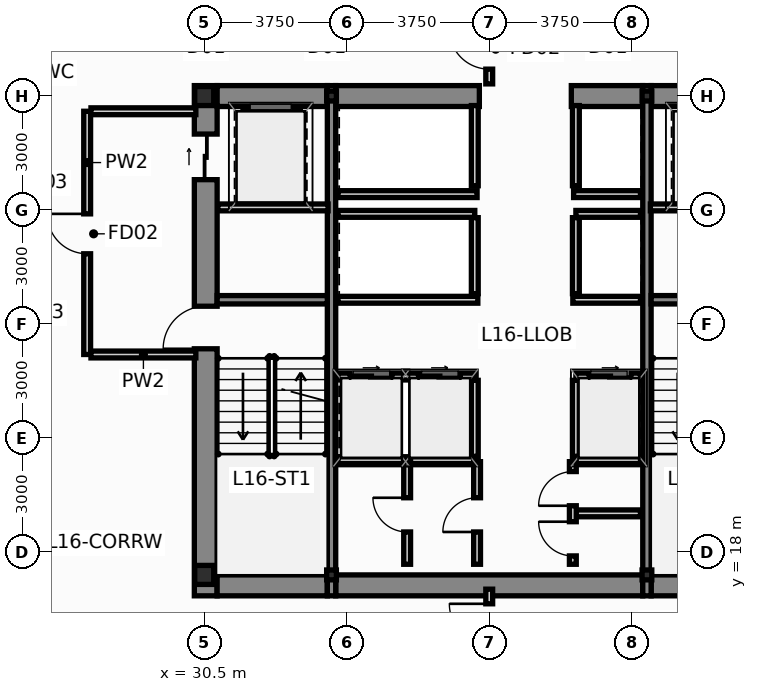
"""IFC4 building model, lengths in metres.
Left out: names, types, materials, properties, quantities, classifications, styles, units other than length and angle.
Written with IfcOpenShell. Run it as: python <this file> out.ifc"""

import sys

from ifc_helpers import new_model, si_unit, direction, frame, frame_2d, origin, origin_2d, place, context, subcontext, project, spatial, rectangle, i_section, extrude, source, transform, mapped, element, fill, save


model = new_model("IFC4")
c1 = context("Model", 3, precision=1e-05, world=origin(), true_north=direction((0.0, 1.0)))
c2 = subcontext(c1, "Body", "Model", "MODEL_VIEW")
j1 = project(units=[si_unit("LENGTHUNIT", "METRE"), si_unit("PLANEANGLEUNIT", "RADIAN")], contexts=[c1])
p1 = place(None, origin())
s1 = spatial("IfcSite", under=j1, at=p1, CompositionType="ELEMENT")
p2 = place(p1, origin())
s2 = spatial("IfcBuilding", under=s1, at=p2, CompositionType="ELEMENT")
p3 = place(p2, frame((0.0, 0.0, 64.1)))
s3 = spatial("IfcBuildingStorey", under=s2, at=p3, CompositionType="ELEMENT", Elevation=64.1)
m1 = source(origin(), c2, "Body", "SweptSolid", [
    extrude(i_section(OverallWidth=0.5, OverallDepth=0.5, WebThickness=0.028, FlangeThickness=0.04, at=origin_2d()), origin(), (0.0, 0.0, 1.0), 3.65),
])
for number, where, z_axis, x_axis in (
    (1, (30.5, 17.4, 0.0), (0.0, 0.0, 1.0), (1.0, 0.0, 0.0)),
    (2, (30.5, 30.0, 0.0), (0.0, 0.0, 1.0), (1.0, 0.0, 0.0)),
):
    element("IfcColumn", number, at=place(p3, frame(where, z_axis=z_axis, x_axis=x_axis)), inside=s3, PredefinedType="COLUMN", context=c2, shape_type="MappedRepresentation", body=[
        mapped(m1, transform((0.0, 0.0, 0.0), scale=1.0)),
    ])
m2 = source(origin(), c2, "Body", "SweptSolid", [
    extrude(i_section(OverallWidth=0.256, OverallDepth=0.26, WebThickness=0.01, FlangeThickness=0.017, at=origin_2d()), origin(), (0.0, 0.0, 1.0), 3.65),
])
for number, where, z_axis, x_axis in (
    (3, (33.85, 17.4, 0.0), (0.0, 0.0, 1.0), (1.0, 0.0, 0.0)),
    (4, (42.15, 17.4, 0.0), (0.0, 0.0, 1.0), (1.0, 0.0, 0.0)),
    (5, (33.85, 30.0, 0.0), (0.0, 0.0, 1.0), (1.0, 0.0, 0.0)),
    (6, (42.15, 30.0, 0.0), (0.0, 0.0, 1.0), (1.0, 0.0, 0.0)),
):
    element("IfcColumn", number, at=place(p3, frame(where, z_axis=z_axis, x_axis=x_axis)), inside=s3, PredefinedType="COLUMN", context=c2, shape_type="MappedRepresentation", body=[
        mapped(m2, transform((0.0, 0.0, 0.0), scale=1.0)),
    ])
p4 = place(p3, frame((30.54, 16.85, 0.0), z_axis=(0.0, 0.0, 1.0), x_axis=(0.0, 1.0, 0.0)))
e7 = element("IfcWall", 7, at=p4, inside=s3, PredefinedType="SHEAR", context=c2, shape_type="SweptSolid", body=[
    extrude(rectangle(XDim=13.425, YDim=0.6, at=frame_2d((6.712, 0.0))), origin(), (0.0, 0.0, 1.0), 3.65),
])
p5 = place(p4, frame((6.5, 0.0, 0.0)))
e8 = element("IfcOpeningElement", 8, at=p5, cuts=e7, PredefinedType="OPENING", context=c2, shape_type="SweptSolid", body=[
    extrude(rectangle(XDim=1.12, YDim=2.15, at=frame_2d((0.56, 1.075))), frame((0.0, 0.312, 0.0), z_axis=(0.0, -1.0, 0.0), x_axis=(1.0, 0.0, 0.0)), (0.0, 0.0, 1.0), 0.624),
])
p6 = place(p4, frame((10.95, 0.0, 0.0)))
e9 = element("IfcOpeningElement", 9, at=p6, cuts=e7, PredefinedType="OPENING", context=c2, shape_type="SweptSolid", body=[
    extrude(rectangle(XDim=1.2, YDim=2.2, at=frame_2d((0.6, 1.1))), frame((0.0, 0.312, 0.0), z_axis=(0.0, -1.0, 0.0), x_axis=(1.0, 0.0, 0.0)), (0.0, 0.0, 1.0), 0.624),
])
p7 = place(p3, frame((30.84, 17.125, 0.0), z_axis=(0.0, 0.0, 1.0), x_axis=(1.0, 0.0, 0.0)))
e10 = element("IfcWall", 10, at=p7, inside=s3, PredefinedType="SHEAR", context=c2, shape_type="SweptSolid", body=[
    extrude(rectangle(XDim=2.9, YDim=0.55, at=frame_2d((1.45, 0.0))), origin(), (0.0, 0.0, 1.0), 3.65),
])
p8 = place(p3, frame((33.96, 17.125, 0.0), z_axis=(0.0, 0.0, 1.0), x_axis=(1.0, 0.0, 0.0)))
e11 = element("IfcWall", 11, at=p8, inside=s3, PredefinedType="SHEAR", context=c2, shape_type="SweptSolid", body=[
    extrude(rectangle(XDim=8.08, YDim=0.55, at=frame_2d((4.04, 0.0))), origin(), (0.0, 0.0, 1.0), 3.65),
])
for number, where, z_axis, x_axis in (
    (12, (42.26, 17.125, 0.0), (0.0, 0.0, 1.0), (1.0, 0.0, 0.0)),
    (13, (30.84, 30.0, 0.0), (0.0, 0.0, 1.0), (1.0, 0.0, 0.0)),
):
    element("IfcWall", number, at=place(p3, frame(where, z_axis=z_axis, x_axis=x_axis)), inside=s3, PredefinedType="SHEAR", context=c2, shape_type="SweptSolid", body=[
        extrude(rectangle(XDim=2.9, YDim=0.55, at=frame_2d((1.45, 0.0))), origin(), (0.0, 0.0, 1.0), 3.65),
    ])
p9 = place(p3, frame((33.96, 30.0, 0.0), z_axis=(0.0, 0.0, 1.0), x_axis=(1.0, 0.0, 0.0)))
e14 = element("IfcWall", 14, at=p9, inside=s3, PredefinedType="SHEAR", context=c2, shape_type="SweptSolid", body=[
    extrude(rectangle(XDim=3.78, YDim=0.55, at=frame_2d((1.89, 0.0))), origin(), (0.0, 0.0, 1.0), 3.65),
])
p10 = place(p3, frame((40.16, 30.0, 0.0), z_axis=(0.0, 0.0, 1.0), x_axis=(1.0, 0.0, 0.0)))
e15 = element("IfcWall", 15, at=p10, inside=s3, PredefinedType="SHEAR", context=c2, shape_type="SweptSolid", body=[
    extrude(rectangle(XDim=1.88, YDim=0.55, at=frame_2d((0.94, 0.0))), origin(), (0.0, 0.0, 1.0), 3.65),
])
p11 = place(p3, frame((42.26, 30.0, 0.0), z_axis=(0.0, 0.0, 1.0), x_axis=(1.0, 0.0, 0.0)))
e16 = element("IfcWall", 16, at=p11, inside=s3, PredefinedType="SHEAR", context=c2, shape_type="SweptSolid", body=[
    extrude(rectangle(XDim=2.9, YDim=0.55, at=frame_2d((1.45, 0.0))), origin(), (0.0, 0.0, 1.0), 3.65),
])
for number, where, z_axis, x_axis in (
    (17, (33.85, 16.85, 0.0), (0.0, 0.0, 1.0), (0.0, 1.0, 0.0)),
    (18, (42.15, 16.85, 0.0), (0.0, 0.0, 1.0), (0.0, 1.0, 0.0)),
):
    element("IfcWall", number, at=place(p3, frame(where, z_axis=z_axis, x_axis=x_axis)), inside=s3, PredefinedType="SHEAR", context=c2, shape_type="SweptSolid", body=[
        extrude(rectangle(XDim=13.425, YDim=0.22, at=frame_2d((6.712, 0.0))), origin(), (0.0, 0.0, 1.0), 3.65),
    ])
for number, where, z_axis, x_axis in (
    (19, (30.84, 24.64, 0.0), (0.0, 0.0, 1.0), (1.0, 0.0, 0.0)),
    (20, (42.26, 24.64, 0.0), (0.0, 0.0, 1.0), (1.0, 0.0, 0.0)),
):
    element("IfcWall", number, at=place(p3, frame(where, z_axis=z_axis, x_axis=x_axis)), inside=s3, PredefinedType="SHEAR", context=c2, shape_type="SweptSolid", body=[
        extrude(rectangle(XDim=2.9, YDim=0.22, at=frame_2d((1.45, 0.0))), origin(), (0.0, 0.0, 1.0), 3.65),
    ])
p12 = place(p3, frame((34.02, 22.62, 0.0), z_axis=(0.0, 0.0, 1.0), x_axis=(1.0, 0.0, 0.0)))
e21 = element("IfcWall", 21, at=p12, inside=s3, PredefinedType="PARTITIONING", context=c2, shape_type="SweptSolid", body=[
    extrude(rectangle(XDim=3.6, YDim=0.18, at=frame_2d((1.8, 0.0))), origin(), (0.0, 0.0, 1.0), 3.4),
])
p13 = place(p12, frame((0.32, 0.0, 0.0)))
e22 = element("IfcOpeningElement", 22, at=p13, cuts=e21, PredefinedType="OPENING", context=c2, shape_type="SweptSolid", body=[
    extrude(rectangle(XDim=1.1, YDim=2.2, at=frame_2d((0.55, 1.1))), frame((0.0, 0.102, 0.0), z_axis=(0.0, -1.0, 0.0), x_axis=(1.0, 0.0, 0.0)), (0.0, 0.0, 1.0), 0.204),
])
p14 = place(p12, frame((2.12, 0.0, 0.0)))
e23 = element("IfcOpeningElement", 23, at=p14, cuts=e21, PredefinedType="OPENING", context=c2, shape_type="SweptSolid", body=[
    extrude(rectangle(XDim=1.1, YDim=2.2, at=frame_2d((0.55, 1.1))), frame((0.0, 0.102, 0.0), z_axis=(0.0, -1.0, 0.0), x_axis=(1.0, 0.0, 0.0)), (0.0, 0.0, 1.0), 0.204),
])
p15 = place(p3, frame((40.28, 22.62, 0.0), z_axis=(0.0, 0.0, 1.0), x_axis=(1.0, 0.0, 0.0)))
e24 = element("IfcWall", 24, at=p15, inside=s3, PredefinedType="PARTITIONING", context=c2, shape_type="SweptSolid", body=[
    extrude(rectangle(XDim=1.7, YDim=0.18, at=frame_2d((0.85, 0.0))), origin(), (0.0, 0.0, 1.0), 3.4),
])
p16 = place(p15, frame((0.35, 0.0, 0.0)))
e25 = element("IfcOpeningElement", 25, at=p16, cuts=e24, PredefinedType="OPENING", context=c2, shape_type="SweptSolid", body=[
    extrude(rectangle(XDim=1.1, YDim=2.2, at=frame_2d((0.55, 1.1))), frame((0.0, 0.102, 0.0), z_axis=(0.0, -1.0, 0.0), x_axis=(1.0, 0.0, 0.0)), (0.0, 0.0, 1.0), 0.204),
])
for number, where, z_axis, x_axis in (
    (26, (37.62, 20.52, 0.0), (0.0, 0.0, 1.0), (0.0, 1.0, 0.0)),
    (27, (40.28, 20.52, 0.0), (0.0, 0.0, 1.0), (0.0, 1.0, 0.0)),
):
    element("IfcWall", number, at=place(p3, frame(where, z_axis=z_axis, x_axis=x_axis)), inside=s3, PredefinedType="PARTITIONING", context=c2, shape_type="SweptSolid", body=[
        extrude(rectangle(XDim=2.0, YDim=0.18, at=frame_2d((1.0, 0.0))), origin(), (0.0, 0.0, 1.0), 3.4),
    ])
p17 = place(p3, frame((34.02, 26.9, 0.0), z_axis=(0.0, 0.0, 1.0), x_axis=(1.0, 0.0, 0.0)))
e28 = element("IfcWall", 28, at=p17, inside=s3, PredefinedType="PARTITIONING", context=c2, shape_type="SweptSolid", body=[
    extrude(rectangle(XDim=3.6, YDim=0.18, at=frame_2d((1.8, 0.0))), origin(), (0.0, 0.0, 1.0), 3.4),
])
p18 = place(p3, frame((40.28, 26.9, 0.0), z_axis=(0.0, 0.0, 1.0), x_axis=(1.0, 0.0, 0.0)))
e29 = element("IfcWall", 29, at=p18, inside=s3, PredefinedType="PARTITIONING", context=c2, shape_type="SweptSolid", body=[
    extrude(rectangle(XDim=1.7, YDim=0.18, at=frame_2d((0.85, 0.0))), origin(), (0.0, 0.0, 1.0), 3.4),
])
for number, where, z_axis, x_axis in (
    (30, (37.62, 24.8, 0.0), (0.0, 0.0, 1.0), (0.0, 1.0, 0.0)),
    (31, (40.28, 24.8, 0.0), (0.0, 0.0, 1.0), (0.0, 1.0, 0.0)),
):
    element("IfcWall", number, at=place(p3, frame(where, z_axis=z_axis, x_axis=x_axis)), inside=s3, PredefinedType="PARTITIONING", context=c2, shape_type="SweptSolid", body=[
        extrude(rectangle(XDim=2.0, YDim=0.18, at=frame_2d((1.0, 0.0))), origin(), (0.0, 0.0, 1.0), 3.4),
    ])
p19 = place(p3, frame((34.02, 24.64, 0.0), z_axis=(0.0, 0.0, 1.0), x_axis=(1.0, 0.0, 0.0)))
e32 = element("IfcWall", 32, at=p19, inside=s3, PredefinedType="PARTITIONING", context=c2, shape_type="SweptSolid", body=[
    extrude(rectangle(XDim=3.68, YDim=0.18, at=frame_2d((1.84, 0.0))), origin(), (0.0, 0.0, 1.0), 3.4),
])
p20 = place(p3, frame((40.2, 24.64, 0.0), z_axis=(0.0, 0.0, 1.0), x_axis=(1.0, 0.0, 0.0)))
e33 = element("IfcWall", 33, at=p20, inside=s3, PredefinedType="PARTITIONING", context=c2, shape_type="SweptSolid", body=[
    extrude(rectangle(XDim=1.78, YDim=0.18, at=frame_2d((0.89, 0.0))), origin(), (0.0, 0.0, 1.0), 3.4),
])
p21 = place(p3, frame((34.02, 27.42, 0.0), z_axis=(0.0, 0.0, 1.0), x_axis=(1.0, 0.0, 0.0)))
e34 = element("IfcWall", 34, at=p21, inside=s3, PredefinedType="PARTITIONING", context=c2, shape_type="SweptSolid", body=[
    extrude(rectangle(XDim=3.66, YDim=0.18, at=frame_2d((1.83, 0.0))), origin(), (0.0, 0.0, 1.0), 3.4),
])
p22 = place(p3, frame((40.22, 27.42, 0.0), z_axis=(0.0, 0.0, 1.0), x_axis=(1.0, 0.0, 0.0)))
e35 = element("IfcWall", 35, at=p22, inside=s3, PredefinedType="PARTITIONING", context=c2, shape_type="SweptSolid", body=[
    extrude(rectangle(XDim=1.76, YDim=0.18, at=frame_2d((0.88, 0.0))), origin(), (0.0, 0.0, 1.0), 3.4),
])
for number, where, z_axis, x_axis in (
    (36, (37.62, 27.64, 0.0), (0.0, 0.0, 1.0), (0.0, 1.0, 0.0)),
    (37, (40.28, 27.64, 0.0), (0.0, 0.0, 1.0), (0.0, 1.0, 0.0)),
):
    element("IfcWall", number, at=place(p3, frame(where, z_axis=z_axis, x_axis=x_axis)), inside=s3, PredefinedType="PARTITIONING", context=c2, shape_type="SweptSolid", body=[
        extrude(rectangle(XDim=2.11, YDim=0.18, at=frame_2d((1.055, 0.0))), origin(), (0.0, 0.0, 1.0), 3.4),
    ])
p23 = place(p3, frame((27.42, 23.2, 0.0), z_axis=(0.0, 0.0, 1.0), x_axis=(0.0, 1.0, 0.0)))
e38 = element("IfcWall", 38, at=p23, inside=s3, PredefinedType="PARTITIONING", context=c2, shape_type="SweptSolid", body=[
    extrude(rectangle(XDim=6.4, YDim=0.18, at=frame_2d((3.2, 0.0))), origin(), (0.0, 0.0, 1.0), 3.4),
])
p24 = place(p23, frame((2.65, 0.0, 0.0)))
e39 = element("IfcOpeningElement", 39, at=p24, cuts=e38, PredefinedType="OPENING", context=c2, shape_type="SweptSolid", body=[
    extrude(rectangle(XDim=1.05, YDim=2.15, at=frame_2d((0.525, 1.075))), frame((0.0, 0.102, 0.0), z_axis=(0.0, -1.0, 0.0), x_axis=(1.0, 0.0, 0.0)), (0.0, 0.0, 1.0), 0.204),
])
p25 = place(p3, frame((27.52, 23.2, 0.0), z_axis=(0.0, 0.0, 1.0), x_axis=(1.0, 0.0, 0.0)))
e40 = element("IfcWall", 40, at=p25, inside=s3, PredefinedType="PARTITIONING", context=c2, shape_type="SweptSolid", body=[
    extrude(rectangle(XDim=2.76, YDim=0.18, at=frame_2d((1.38, 0.0))), origin(), (0.0, 0.0, 1.0), 3.4),
])
p26 = place(p3, frame((27.52, 29.6, 0.0), z_axis=(0.0, 0.0, 1.0), x_axis=(1.0, 0.0, 0.0)))
e41 = element("IfcWall", 41, at=p26, inside=s3, PredefinedType="PARTITIONING", context=c2, shape_type="SweptSolid", body=[
    extrude(rectangle(XDim=2.76, YDim=0.18, at=frame_2d((1.38, 0.0))), origin(), (0.0, 0.0, 1.0), 2.783),
])
for number, where, z_axis, x_axis in (
    (42, (30.86, 27.07, 0.0), (0.0, 0.0, 1.0), (1.0, 0.0, 0.0)),
    (43, (42.24, 27.07, 0.0), (0.0, 0.0, 1.0), (1.0, 0.0, 0.0)),
):
    element("IfcWall", number, at=place(p3, frame(where, z_axis=z_axis, x_axis=x_axis)), inside=s3, PredefinedType="PARTITIONING", context=c2, shape_type="SweptSolid", body=[
        extrude(rectangle(XDim=2.9, YDim=0.18, at=frame_2d((1.45, 0.0))), origin(), (0.0, 0.0, 1.0), 3.4),
    ])
p27 = place(p3, frame((34.02, 20.42, 0.0), z_axis=(0.0, 0.0, 1.0), x_axis=(1.0, 0.0, 0.0)))
e44 = element("IfcWall", 44, at=p27, inside=s3, PredefinedType="PARTITIONING", context=c2, shape_type="SweptSolid", body=[
    extrude(rectangle(XDim=3.64, YDim=0.18, at=frame_2d((1.82, 0.0))), origin(), (0.0, 0.0, 1.0), 3.4),
])
p28 = place(p3, frame((40.22, 20.42, 0.0), z_axis=(0.0, 0.0, 1.0), x_axis=(1.0, 0.0, 0.0)))
e45 = element("IfcWall", 45, at=p28, inside=s3, PredefinedType="PARTITIONING", context=c2, shape_type="SweptSolid", body=[
    extrude(rectangle(XDim=1.76, YDim=0.18, at=frame_2d((0.88, 0.0))), origin(), (0.0, 0.0, 1.0), 3.4),
])
p29 = place(p3, frame((35.84, 17.68, 0.0), z_axis=(0.0, 0.0, 1.0), x_axis=(0.0, 1.0, 0.0)))
e46 = element("IfcWall", 46, at=p29, inside=s3, PredefinedType="PARTITIONING", context=c2, shape_type="SweptSolid", body=[
    extrude(rectangle(XDim=2.7, YDim=0.18, at=frame_2d((1.35, 0.0))), origin(), (0.0, 0.0, 1.0), 3.4),
])
p30 = place(p29, frame((0.85, 0.0, 0.0)))
e47 = element("IfcOpeningElement", 47, at=p30, cuts=e46, PredefinedType="OPENING", context=c2, shape_type="SweptSolid", body=[
    extrude(rectangle(XDim=0.9, YDim=2.1, at=frame_2d((0.45, 1.05))), frame((0.0, 0.102, 0.0), z_axis=(0.0, -1.0, 0.0), x_axis=(1.0, 0.0, 0.0)), (0.0, 0.0, 1.0), 0.204),
])
p31 = place(p3, frame((37.68, 17.68, 0.0), z_axis=(0.0, 0.0, 1.0), x_axis=(0.0, 1.0, 0.0)))
e48 = element("IfcWall", 48, at=p31, inside=s3, PredefinedType="PARTITIONING", context=c2, shape_type="SweptSolid", body=[
    extrude(rectangle(XDim=2.7, YDim=0.18, at=frame_2d((1.35, 0.0))), origin(), (0.0, 0.0, 1.0), 3.4),
])
p32 = place(p31, frame((0.85, 0.0, 0.0)))
e49 = element("IfcOpeningElement", 49, at=p32, cuts=e48, PredefinedType="OPENING", context=c2, shape_type="SweptSolid", body=[
    extrude(rectangle(XDim=0.9, YDim=2.1, at=frame_2d((0.45, 1.05))), frame((0.0, 0.102, 0.0), z_axis=(0.0, -1.0, 0.0), x_axis=(1.0, 0.0, 0.0)), (0.0, 0.0, 1.0), 0.204),
])
p33 = place(p3, frame((40.28, 19.02, 0.0), z_axis=(0.0, 0.0, 1.0), x_axis=(1.0, 0.0, 0.0)))
e50 = element("IfcWall", 50, at=p33, inside=s3, PredefinedType="PARTITIONING", context=c2, shape_type="SweptSolid", body=[
    extrude(rectangle(XDim=1.7, YDim=0.18, at=frame_2d((0.85, 0.0))), origin(), (0.0, 0.0, 1.0), 3.4),
])
p34 = place(p3, frame((40.2, 17.68, 0.0), z_axis=(0.0, 0.0, 1.0), x_axis=(0.0, 1.0, 0.0)))
e51 = element("IfcWall", 51, at=p34, inside=s3, PredefinedType="PARTITIONING", context=c2, shape_type="SweptSolid", body=[
    extrude(rectangle(XDim=2.7, YDim=0.18, at=frame_2d((1.35, 0.0))), origin(), (0.0, 0.0, 1.0), 3.4),
])
p35 = place(p34, frame((0.22, 0.0, 0.0)))
e52 = element("IfcOpeningElement", 52, at=p35, cuts=e51, PredefinedType="OPENING", context=c2, shape_type="SweptSolid", body=[
    extrude(rectangle(XDim=0.9, YDim=2.1, at=frame_2d((0.45, 1.05))), frame((0.0, 0.102, 0.0), z_axis=(0.0, -1.0, 0.0), x_axis=(1.0, 0.0, 0.0)), (0.0, 0.0, 1.0), 0.204),
])
p36 = place(p34, frame((1.54, 0.0, 0.0)))
e53 = element("IfcOpeningElement", 53, at=p36, cuts=e51, PredefinedType="OPENING", context=c2, shape_type="SweptSolid", body=[
    extrude(rectangle(XDim=0.9, YDim=2.1, at=frame_2d((0.45, 1.05))), frame((0.0, 0.102, 0.0), z_axis=(0.0, -1.0, 0.0), x_axis=(1.0, 0.0, 0.0)), (0.0, 0.0, 1.0), 0.204),
])
p37 = place(p3, frame((38.0, 15.205, 0.0), z_axis=(0.0, 0.0, 1.0), x_axis=(0.0, 1.0, 0.0)))
e54 = element("IfcWall", 54, at=p37, inside=s3, PredefinedType="PARTITIONING", context=c2, shape_type="SweptSolid", body=[
    extrude(rectangle(XDim=1.82, YDim=0.18, at=frame_2d((0.91, 0.0))), origin(), (0.0, 0.0, 1.0), 3.4),
])
p38 = place(p37, frame((0.385, 0.0, 0.0)))
e55 = element("IfcOpeningElement", 55, at=p38, cuts=e54, PredefinedType="OPENING", context=c2, shape_type="SweptSolid", body=[
    extrude(rectangle(XDim=1.05, YDim=2.15, at=frame_2d((0.525, 1.075))), frame((0.0, 0.102, 0.0), z_axis=(0.0, -1.0, 0.0), x_axis=(1.0, 0.0, 0.0)), (0.0, 0.0, 1.0), 0.204),
])
p39 = place(p3, frame((38.0, 30.32, 0.0), z_axis=(0.0, 0.0, 1.0), x_axis=(0.0, 1.0, 0.0)))
e56 = element("IfcWall", 56, at=p39, inside=s3, PredefinedType="PARTITIONING", context=c2, shape_type="SweptSolid", body=[
    extrude(rectangle(XDim=1.825, YDim=0.18, at=frame_2d((0.913, 0.0))), origin(), (0.0, 0.0, 1.0), 3.4),
])
p40 = place(p39, frame((0.388, 0.0, 0.0)))
e57 = element("IfcOpeningElement", 57, at=p40, cuts=e56, PredefinedType="OPENING", context=c2, shape_type="SweptSolid", body=[
    extrude(rectangle(XDim=1.05, YDim=2.15, at=frame_2d((0.525, 1.075))), frame((0.0, 0.102, 0.0), z_axis=(0.0, -1.0, 0.0), x_axis=(1.0, 0.0, 0.0)), (0.0, 0.0, 1.0), 0.204),
])
p41 = place(p5, origin())
e58 = element("IfcDoor", 58, at=p41, inside=s3, OperationType="SINGLE_SWING_LEFT", PredefinedType="DOOR", context=c2, shape_type="SweptSolid", body=[
    extrude(rectangle(XDim=1.12, YDim=2.15, at=frame_2d((0.56, 1.075))), frame((0.0, 0.025, 0.0), z_axis=(0.0, -1.0, 0.0), x_axis=(1.0, 0.0, 0.0)), (0.0, 0.0, 1.0), 0.05),
])
fill(e8, e58)
p42 = place(p6, origin())
e59 = element("IfcDoor", 59, at=p42, inside=s3, OperationType="SLIDING_TO_LEFT", PredefinedType="DOOR", context=c2, shape_type="SweptSolid", body=[
    extrude(rectangle(XDim=1.2, YDim=2.2, at=frame_2d((0.6, 1.1))), frame((0.0, 0.025, 0.0), z_axis=(0.0, -1.0, 0.0), x_axis=(1.0, 0.0, 0.0)), (0.0, 0.0, 1.0), 0.05),
])
fill(e9, e59)
p43 = place(p13, origin())
e60 = element("IfcDoor", 60, at=p43, inside=s3, OperationType="SLIDING_TO_LEFT", PredefinedType="DOOR", context=c2, shape_type="SweptSolid", body=[
    extrude(rectangle(XDim=1.1, YDim=2.2, at=frame_2d((0.55, 1.1))), frame((0.0, 0.025, 0.0), z_axis=(0.0, -1.0, 0.0), x_axis=(1.0, 0.0, 0.0)), (0.0, 0.0, 1.0), 0.05),
])
fill(e22, e60)
p44 = place(p14, origin())
e61 = element("IfcDoor", 61, at=p44, inside=s3, OperationType="SLIDING_TO_RIGHT", PredefinedType="DOOR", context=c2, shape_type="SweptSolid", body=[
    extrude(rectangle(XDim=1.1, YDim=2.2, at=frame_2d((0.55, 1.1))), frame((0.0, 0.025, 0.0), z_axis=(0.0, -1.0, 0.0), x_axis=(1.0, 0.0, 0.0)), (0.0, 0.0, 1.0), 0.05),
])
fill(e23, e61)
p45 = place(p16, origin())
e62 = element("IfcDoor", 62, at=p45, inside=s3, OperationType="SLIDING_TO_LEFT", PredefinedType="DOOR", context=c2, shape_type="SweptSolid", body=[
    extrude(rectangle(XDim=1.1, YDim=2.2, at=frame_2d((0.55, 1.1))), frame((0.0, 0.025, 0.0), z_axis=(0.0, -1.0, 0.0), x_axis=(1.0, 0.0, 0.0)), (0.0, 0.0, 1.0), 0.05),
])
fill(e25, e62)
p46 = place(p24, origin())
e63 = element("IfcDoor", 63, at=p46, inside=s3, OperationType="SINGLE_SWING_RIGHT", PredefinedType="DOOR", context=c2, shape_type="SweptSolid", body=[
    extrude(rectangle(XDim=1.05, YDim=2.15, at=frame_2d((0.525, 1.075))), frame((0.0, 0.025, 0.0), z_axis=(0.0, -1.0, 0.0), x_axis=(1.0, 0.0, 0.0)), (0.0, 0.0, 1.0), 0.05),
])
fill(e39, e63)
p47 = place(p30, origin())
e64 = element("IfcDoor", 64, at=p47, inside=s3, OperationType="SINGLE_SWING_RIGHT", PredefinedType="DOOR", context=c2, shape_type="SweptSolid", body=[
    extrude(rectangle(XDim=0.9, YDim=2.1, at=frame_2d((0.45, 1.05))), frame((0.0, 0.025, 0.0), z_axis=(0.0, -1.0, 0.0), x_axis=(1.0, 0.0, 0.0)), (0.0, 0.0, 1.0), 0.05),
])
fill(e47, e64)
p48 = place(p32, origin())
e65 = element("IfcDoor", 65, at=p48, inside=s3, OperationType="SINGLE_SWING_LEFT", PredefinedType="DOOR", context=c2, shape_type="SweptSolid", body=[
    extrude(rectangle(XDim=0.9, YDim=2.1, at=frame_2d((0.45, 1.05))), frame((0.0, 0.025, 0.0), z_axis=(0.0, -1.0, 0.0), x_axis=(1.0, 0.0, 0.0)), (0.0, 0.0, 1.0), 0.05),
])
fill(e49, e65)
p49 = place(p35, origin())
e66 = element("IfcDoor", 66, at=p49, inside=s3, OperationType="SINGLE_SWING_RIGHT", PredefinedType="DOOR", context=c2, shape_type="SweptSolid", body=[
    extrude(rectangle(XDim=0.9, YDim=2.1, at=frame_2d((0.45, 1.05))), frame((0.0, 0.025, 0.0), z_axis=(0.0, -1.0, 0.0), x_axis=(1.0, 0.0, 0.0)), (0.0, 0.0, 1.0), 0.05),
])
fill(e52, e66)
p50 = place(p36, origin())
e67 = element("IfcDoor", 67, at=p50, inside=s3, OperationType="SINGLE_SWING_LEFT", PredefinedType="DOOR", context=c2, shape_type="SweptSolid", body=[
    extrude(rectangle(XDim=0.9, YDim=2.1, at=frame_2d((0.45, 1.05))), frame((0.0, 0.025, 0.0), z_axis=(0.0, -1.0, 0.0), x_axis=(1.0, 0.0, 0.0)), (0.0, 0.0, 1.0), 0.05),
])
fill(e53, e67)
p51 = place(p38, origin())
e68 = element("IfcDoor", 68, at=p51, inside=s3, OperationType="SINGLE_SWING_RIGHT", PredefinedType="DOOR", context=c2, shape_type="SweptSolid", body=[
    extrude(rectangle(XDim=1.05, YDim=2.15, at=frame_2d((0.525, 1.075))), frame((0.0, 0.025, 0.0), z_axis=(0.0, -1.0, 0.0), x_axis=(1.0, 0.0, 0.0)), (0.0, 0.0, 1.0), 0.05),
])
fill(e55, e68)
p52 = place(p40, origin())
e69 = element("IfcDoor", 69, at=p52, inside=s3, OperationType="SINGLE_SWING_RIGHT", PredefinedType="DOOR", context=c2, shape_type="SweptSolid", body=[
    extrude(rectangle(XDim=1.05, YDim=2.15, at=frame_2d((0.525, 1.075))), frame((0.0, 0.025, 0.0), z_axis=(0.0, -1.0, 0.0), x_axis=(1.0, 0.0, 0.0)), (0.0, 0.0, 1.0), 0.05),
])
fill(e57, e69)
save(model, sys.argv[1])
